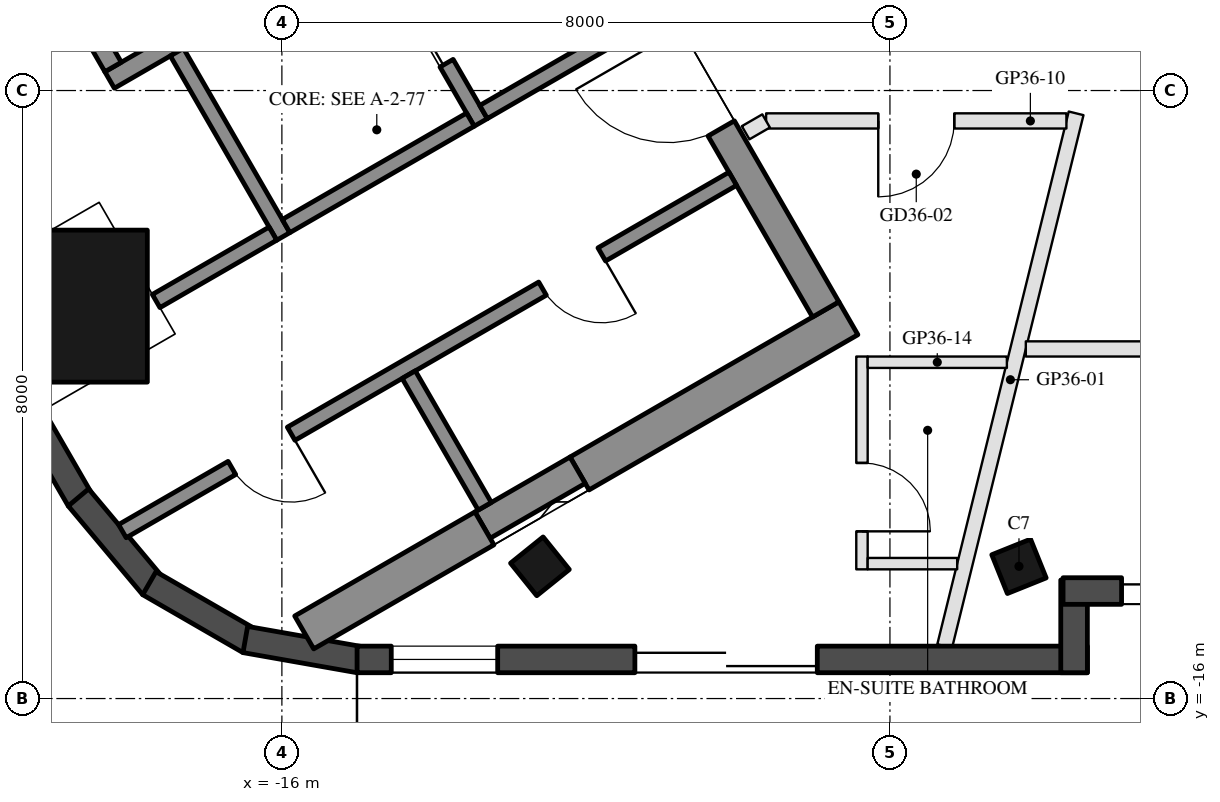
"""IFC4 building model, lengths in metres.
Left out: names, types, materials, properties, quantities, classifications, styles, units other than length and angle.
Written with IfcOpenShell. Run it as: python <this file> out.ifc"""

import sys

from ifc_helpers import new_model, si_unit, direction, frame, frame_2d, origin, origin_2d, place, context, subcontext, project, spatial, rectangle, hollow_rectangle, extrude, boolean, halfspace, element, fill, save


model = new_model("IFC4")
c1 = context("Model", 3, precision=1e-05, world=origin(), true_north=direction((0.0, 1.0)))
c2 = subcontext(c1, "Body", "Model", "MODEL_VIEW")
j1 = project(units=[si_unit("LENGTHUNIT", "METRE"), si_unit("PLANEANGLEUNIT", "RADIAN")], contexts=[c1])
p1 = place(None, origin())
s1 = spatial("IfcSite", under=j1, at=p1, CompositionType="ELEMENT")
p2 = place(p1, origin())
s2 = spatial("IfcBuilding", under=s1, at=p2, CompositionType="ELEMENT")
p3 = place(p2, frame((0.0, 0.0, 328.1)))
s3 = spatial("IfcBuildingStorey", under=s2, at=p3, CompositionType="ELEMENT", Elevation=328.1)
p4 = place(p3, frame((-12.605, -14.26, 0.0), z_axis=(0.121069901949, 0.150398600122, 0.981184151892), x_axis=(-0.992601568988, 0.00920533993, 0.121067695767)))
e1 = element("IfcColumn", 1, at=p4, inside=s3, PredefinedType="COLUMN", context=c2, shape_type="SweptSolid", body=[
    boolean("DIFFERENCE", boolean("DIFFERENCE", extrude(hollow_rectangle(XDim=0.55, YDim=0.55, WallThickness=0.025, at=origin_2d()), origin(), (0.0, 0.0, 1.0), 3.771), halfspace(frame((0.0, 0.0, 0.04), z_axis=(0.0, 0.0, 1.0), x_axis=(1.0, 0.0, 0.0)), True)), halfspace(frame((0.0, 0.0, 3.753), z_axis=(0.0, 0.0, 1.0), x_axis=(1.0, 0.0, 0.0)), False)),
])
p5 = place(p3, frame((-6.302, -14.26, 0.0), z_axis=(0.060870463553, 0.151232178432, 0.986622326361), x_axis=(-0.99813528898, 0.004713590867, 0.06085825296)))
e2 = element("IfcColumn", 2, at=p5, inside=s3, PredefinedType="COLUMN", context=c2, shape_type="SweptSolid", body=[
    boolean("DIFFERENCE", boolean("DIFFERENCE", extrude(hollow_rectangle(XDim=0.55, YDim=0.55, WallThickness=0.025, at=origin_2d()), origin(), (0.0, 0.0, 1.0), 3.75), halfspace(frame((0.0, 0.0, 0.034), z_axis=(0.0, 0.0, 1.0), x_axis=(1.0, 0.0, 0.0)), True)), halfspace(frame((0.0, 0.0, 3.735), z_axis=(0.0, 0.0, 1.0), x_axis=(1.0, 0.0, 0.0)), False)),
])
p6 = place(p3, frame((-18.77, -10.837, 0.0), z_axis=(0.190346159062, 0.109881938965, 0.975548204457), x_axis=(-0.499994868029, 0.866028366632, 1.1507946e-05)))
e3 = element("IfcColumn", 3, at=p6, inside=s3, PredefinedType="COLUMN", context=c2, shape_type="SweptSolid", body=[
    boolean("DIFFERENCE", boolean("DIFFERENCE", extrude(hollow_rectangle(XDim=2.0, YDim=2.0, WallThickness=0.05, at=origin_2d()), origin(), (0.0, 0.0, 1.0), 3.793), halfspace(frame((0.0, 0.0, 0.113), z_axis=(0.0, 0.0, 1.0), x_axis=(1.0, 0.0, 0.0)), True)), halfspace(frame((0.0, 0.0, 3.744), z_axis=(0.0, 0.0, 1.0), x_axis=(1.0, 0.0, 0.0)), False)),
])
p7 = place(p3, frame((-20.916, -9.47, 0.0), z_axis=(0.0, 0.0, 1.0), x_axis=(0.500042384281, -0.866000931825, 0.0)))
e4 = element("IfcWall", 4, at=p7, inside=s3, PredefinedType="SOLIDWALL", context=c2, shape_type="SweptSolid", body=[
    extrude(rectangle(XDim=4.514, YDim=0.35, at=frame_2d((2.257, 0.0))), origin(), (0.0, 0.0, 1.0), 3.45),
])
p8 = place(p3, frame((-18.677, -13.354, 0.0), z_axis=(0.0, 0.0, 1.0), x_axis=(0.642812493629, -0.766023562323, 0.0)))
e5 = element("IfcWall", 5, at=p8, inside=s3, PredefinedType="SOLIDWALL", context=c2, shape_type="SweptSolid", body=[
    extrude(rectangle(XDim=1.524, YDim=0.35, at=frame_2d((0.762, 0.0))), origin(), (0.0, 0.0, 1.0), 3.45),
])
for number, where, z_axis, x_axis in (
    (6, (-17.744, -14.482, 0.0), (0.0, 0.0, 1.0), (0.866, -0.5, 0.0)),
    (7, (-16.481, -15.223, 0.0), (0.0, 0.0, 1.0), (0.985, -0.174, 0.0)),
):
    element("IfcWall", number, at=place(p3, frame(where, z_axis=z_axis, x_axis=x_axis)), inside=s3, PredefinedType="SOLIDWALL", context=c2, shape_type="SweptSolid", body=[
        extrude(rectangle(XDim=1.524, YDim=0.35, at=frame_2d((0.762, 0.0))), origin(), (0.0, 0.0, 1.0), 3.45),
    ])
p9 = place(p3, frame((-15.011, -15.485, 0.0), z_axis=(0.0, 0.0, 1.0), x_axis=(1.0, 0.0, 0.0)))
e8 = element("IfcWall", 8, at=p9, inside=s3, PredefinedType="SOLIDWALL", context=c2, shape_type="SweptSolid", body=[
    extrude(rectangle(XDim=9.608, YDim=0.35, at=frame_2d((4.804, 0.0))), origin(), (0.0, 0.0, 1.0), 3.45),
])
p10 = place(p9, frame((0.45, 0.0, 0.3)))
e9 = element("IfcOpeningElement", 9, at=p10, cuts=e8, PredefinedType="OPENING", context=c2, shape_type="SweptSolid", body=[
    extrude(rectangle(XDim=1.4, YDim=2.65, at=frame_2d((0.7, 1.325))), frame((0.0, 0.185, 0.0), z_axis=(0.0, -1.0, 0.0), x_axis=(1.0, 0.0, 0.0)), (0.0, 0.0, 1.0), 0.37),
])
p11 = place(p9, frame((3.655, 0.0, 0.0)))
e10 = element("IfcOpeningElement", 10, at=p11, cuts=e8, PredefinedType="OPENING", context=c2, shape_type="SweptSolid", body=[
    extrude(rectangle(XDim=2.4, YDim=2.4, at=frame_2d((1.2, 1.2))), frame((0.0, 0.185, 0.0), z_axis=(0.0, -1.0, 0.0), x_axis=(1.0, 0.0, 0.0)), (0.0, 0.0, 1.0), 0.37),
])
p12 = place(p3, frame((-5.577, -15.66, 0.0), z_axis=(0.0, 0.0, 1.0), x_axis=(0.0, 1.0, 0.0)))
e11 = element("IfcWall", 11, at=p12, inside=s3, PredefinedType="SOLIDWALL", context=c2, shape_type="SweptSolid", body=[
    extrude(rectangle(XDim=1.22, YDim=0.35, at=frame_2d((0.61, 0.0))), origin(), (0.0, 0.0, 1.0), 3.45),
])
p13 = place(p3, frame((-5.722, -14.585, 0.0), z_axis=(0.0, 0.0, 1.0), x_axis=(1.0, 0.0, 0.0)))
e12 = element("IfcWall", 12, at=p13, inside=s3, PredefinedType="SOLIDWALL", context=c2, shape_type="SweptSolid", body=[
    extrude(rectangle(XDim=5.142, YDim=0.35, at=frame_2d((2.571, 0.0))), origin(), (0.0, 0.0, 1.0), 3.45),
])
p14 = place(p13, frame((0.77, 0.0, 0.0)))
e13 = element("IfcOpeningElement", 13, at=p14, cuts=e12, PredefinedType="OPENING", context=c2, shape_type="SweptSolid", body=[
    extrude(rectangle(XDim=2.4, YDim=2.4, at=frame_2d((1.2, 1.2))), frame((0.0, 0.185, 0.0), z_axis=(0.0, -1.0, 0.0), x_axis=(1.0, 0.0, 0.0)), (0.0, 0.0, 1.0), 0.37),
])
p15 = place(p13, frame((3.47, 0.0, 0.3)))
e14 = element("IfcOpeningElement", 14, at=p15, cuts=e12, PredefinedType="OPENING", context=c2, shape_type="SweptSolid", body=[
    extrude(rectangle(XDim=0.9, YDim=2.65, at=frame_2d((0.45, 1.325))), frame((0.0, 0.185, 0.0), z_axis=(0.0, -1.0, 0.0), x_axis=(1.0, 0.0, 0.0)), (0.0, 0.0, 1.0), 0.37),
])
p16 = place(p3, frame((-8.547, -10.997, 0.0), z_axis=(0.0, 0.0, 1.0), x_axis=(-0.866031306094, -0.49998977676, 0.0)))
e15 = element("IfcWall", 15, at=p16, inside=s3, PredefinedType="SHEAR", context=c2, shape_type="SweptSolid", body=[
    extrude(rectangle(XDim=4.084, YDim=0.5, at=frame_2d((2.042, 0.0))), origin(), (0.0, 0.0, 1.0), 3.45),
])
p17 = place(p3, frame((-12.109, -12.996, 0.0), z_axis=(0.0, 0.0, 1.0), x_axis=(-0.865977303747, -0.500083302456, 0.0)))
e16 = element("IfcWall", 16, at=p17, inside=s3, PredefinedType="SHEAR", context=c2, shape_type="SweptSolid", body=[
    extrude(rectangle(XDim=1.445, YDim=0.4, at=frame_2d((0.722, 0.0))), origin(), (0.0, 0.0, 1.0), 3.45),
])
p18 = place(p3, frame((-13.335, -13.761, 0.0), z_axis=(0.0, 0.0, 1.0), x_axis=(-0.866034122891, -0.49998489776, 0.0)))
e17 = element("IfcWall", 17, at=p18, inside=s3, PredefinedType="SHEAR", context=c2, shape_type="SweptSolid", body=[
    extrude(rectangle(XDim=2.738, YDim=0.5, at=frame_2d((1.369, 0.0))), origin(), (0.0, 0.0, 1.0), 3.45),
])
p19 = place(p3, frame((-13.845, -2.22, 0.0), z_axis=(0.0, 0.0, 1.0), x_axis=(0.500004234368, -0.866022959057, 0.0)))
e18 = element("IfcWall", 18, at=p19, inside=s3, PredefinedType="SHEAR", context=c2, shape_type="SweptSolid", body=[
    extrude(rectangle(XDim=10.0, YDim=0.4, at=frame_2d((5.0, 0.0))), origin(), (0.0, 0.0, 1.0), 3.45),
])
p20 = place(p19, frame((3.55, 0.0, 0.0)))
e19 = element("IfcOpeningElement", 19, at=p20, cuts=e18, PredefinedType="OPENING", context=c2, shape_type="SweptSolid", body=[
    extrude(rectangle(XDim=1.1, YDim=2.1, at=frame_2d((0.55, 1.05))), frame((0.0, 0.21, 0.0), z_axis=(0.0, -1.0, 0.0), x_axis=(1.0, 0.0, 0.0)), (0.0, 0.0, 1.0), 0.42),
])
p21 = place(p19, frame((5.85, 0.0, 0.0)))
e20 = element("IfcOpeningElement", 20, at=p21, cuts=e18, PredefinedType="OPENING", context=c2, shape_type="SweptSolid", body=[
    extrude(rectangle(XDim=1.4, YDim=2.1, at=frame_2d((0.7, 1.05))), frame((0.0, 0.21, 0.0), z_axis=(0.0, -1.0, 0.0), x_axis=(1.0, 0.0, 0.0)), (0.0, 0.0, 1.0), 0.42),
])
p22 = place(p3, frame((-12.681, -4.636, 0.0), z_axis=(0.0, 0.0, 1.0), x_axis=(-0.866021702275, -0.500006411147, 0.0)))
e21 = element("IfcWall", 21, at=p22, inside=s3, PredefinedType="SHEAR", context=c2, shape_type="SweptSolid", body=[
    extrude(rectangle(XDim=6.45, YDim=0.25, at=frame_2d((3.225, 0.0))), origin(), (0.0, 0.0, 1.0), 3.45),
])
p23 = place(p22, frame((0.3, 0.0, 0.0)))
e22 = element("IfcOpeningElement", 22, at=p23, cuts=e21, PredefinedType="OPENING", context=c2, shape_type="SweptSolid", body=[
    extrude(rectangle(XDim=1.0, YDim=2.1, at=frame_2d((0.5, 1.05))), frame((0.0, 0.135, 0.0), z_axis=(0.0, -1.0, 0.0), x_axis=(1.0, 0.0, 0.0)), (0.0, 0.0, 1.0), 0.27),
])
p24 = place(p3, frame((-19.496, -5.482, 0.0), z_axis=(0.0, 0.0, 1.0), x_axis=(0.499990435942, -0.866030925526, 0.0)))
e23 = element("IfcWall", 23, at=p24, inside=s3, PredefinedType="SHEAR", context=c2, shape_type="SweptSolid", body=[
    extrude(rectangle(XDim=2.55, YDim=0.25, at=frame_2d((1.275, 0.0))), origin(), (0.0, 0.0, 1.0), 3.45),
])
p25 = place(p3, frame((-17.381, -7.495, 0.0), z_axis=(0.0, 0.0, 1.0), x_axis=(0.500011755427, -0.866018616679, 0.0)))
e24 = element("IfcWall", 24, at=p25, inside=s3, PredefinedType="SHEAR", context=c2, shape_type="SweptSolid", body=[
    extrude(rectangle(XDim=2.8, YDim=0.2, at=frame_2d((1.4, 0.0))), origin(), (0.0, 0.0, 1.0), 3.45),
])
p26 = place(p3, frame((-14.783, -5.995, 0.0), z_axis=(0.0, 0.0, 1.0), x_axis=(0.49994636267, -0.866056369097, 0.0)))
e25 = element("IfcWall", 25, at=p26, inside=s3, PredefinedType="SHEAR", context=c2, shape_type="SweptSolid", body=[
    extrude(rectangle(XDim=2.8, YDim=0.2, at=frame_2d((1.4, 0.0))), origin(), (0.0, 0.0, 1.0), 3.45),
])
p27 = place(p26, frame((0.7, 0.0, 0.0)))
e26 = element("IfcOpeningElement", 26, at=p27, cuts=e25, PredefinedType="OPENING", context=c2, shape_type="SweptSolid", body=[
    extrude(rectangle(XDim=1.2, YDim=2.1, at=frame_2d((0.6, 1.05))), frame((0.0, 0.11, 0.0), z_axis=(0.0, -1.0, 0.0), x_axis=(1.0, 0.0, 0.0)), (0.0, 0.0, 1.0), 0.22),
])
p28 = place(p3, frame((-13.52, -8.383, 0.0), z_axis=(0.0, 0.0, 1.0), x_axis=(-0.866034573852, -0.49998411664, 0.0)))
e27 = element("IfcWall", 27, at=p28, inside=s3, PredefinedType="SHEAR", context=c2, shape_type="SweptSolid", body=[
    extrude(rectangle(XDim=2.8, YDim=0.2, at=frame_2d((1.4, 0.0))), origin(), (0.0, 0.0, 1.0), 3.45),
])
p29 = place(p3, frame((-11.268, -7.083, 0.0), z_axis=(0.0, 0.0, 1.0), x_axis=(-0.866050077142, -0.499957262057, 0.0)))
e28 = element("IfcWall", 28, at=p29, inside=s3, PredefinedType="SHEAR", context=c2, shape_type="SweptSolid", body=[
    extrude(rectangle(XDim=2.4, YDim=0.2, at=frame_2d((1.2, 0.0))), origin(), (0.0, 0.0, 1.0), 3.45),
])
p30 = place(p3, frame((-10.068, -9.162, 0.0), z_axis=(0.0, 0.0, 1.0), x_axis=(-0.866027741594, -0.499995950774, 0.0)))
e29 = element("IfcWall", 29, at=p30, inside=s3, PredefinedType="SHEAR", context=c2, shape_type="SweptSolid", body=[
    extrude(rectangle(XDim=9.272, YDim=0.2, at=frame_2d((4.636, 0.0))), origin(), (0.0, 0.0, 1.0), 3.45),
])
p31 = place(p30, frame((1.99, 0.0, 0.0)))
e30 = element("IfcOpeningElement", 30, at=p31, cuts=e29, PredefinedType="OPENING", context=c2, shape_type="SweptSolid", body=[
    extrude(rectangle(XDim=0.9, YDim=2.1, at=frame_2d((0.45, 1.05))), frame((0.0, 0.11, 0.0), z_axis=(0.0, -1.0, 0.0), x_axis=(1.0, 0.0, 0.0)), (0.0, 0.0, 1.0), 0.22),
])
p32 = place(p30, frame((6.709, 0.0, 0.0)))
e31 = element("IfcOpeningElement", 31, at=p32, cuts=e29, PredefinedType="OPENING", context=c2, shape_type="SweptSolid", body=[
    extrude(rectangle(XDim=0.9, YDim=2.1, at=frame_2d((0.45, 1.05))), frame((0.0, 0.11, 0.0), z_axis=(0.0, -1.0, 0.0), x_axis=(1.0, 0.0, 0.0)), (0.0, 0.0, 1.0), 0.22),
])
p33 = place(p3, frame((-16.118, -9.883, 0.0), z_axis=(0.0, 0.0, 1.0), x_axis=(-0.86600680221, -0.500032217487, 0.0)))
e32 = element("IfcWall", 32, at=p33, inside=s3, PredefinedType="SHEAR", context=c2, shape_type="SweptSolid", body=[
    extrude(rectangle(XDim=1.774, YDim=0.2, at=frame_2d((0.887, 0.0))), origin(), (0.0, 0.0, 1.0), 3.45),
])
p34 = place(p3, frame((-14.331, -11.738, 0.0), z_axis=(0.0, 0.0, 1.0), x_axis=(0.499972520799, -0.866041268327, 0.0)))
e33 = element("IfcWall", 33, at=p34, inside=s3, PredefinedType="SHEAR", context=c2, shape_type="SweptSolid", body=[
    extrude(rectangle(XDim=2.0, YDim=0.2, at=frame_2d((1.0, 0.0))), origin(), (0.0, 0.0, 1.0), 3.45),
])
p35 = place(p3, frame((-7.28, -15.31, 0.0), z_axis=(0.0, 0.0, 1.0), x_axis=(0.239495270955, 0.970897530736, 0.0)))
e34 = element("IfcWall", 34, at=p35, inside=s3, PredefinedType="PARTITIONING", context=c2, shape_type="SweptSolid", body=[
    extrude(rectangle(XDim=7.22, YDim=0.2, at=frame_2d((3.61, 0.0))), origin(), (0.0, 0.0, 1.0), 3.05),
])
p36 = place(p3, frame((-5.678, -8.4, 0.0), z_axis=(0.0, 0.0, 1.0), x_axis=(-1.0, 0.0, 0.0)))
e35 = element("IfcWall", 35, at=p36, inside=s3, PredefinedType="PARTITIONING", context=c2, shape_type="SweptSolid", body=[
    extrude(rectangle(XDim=3.951, YDim=0.2, at=frame_2d((1.976, 0.0))), origin(), (0.0, 0.0, 1.0), 3.05),
])
p37 = place(p36, frame((1.476, 0.0, 0.0)))
e36 = element("IfcOpeningElement", 36, at=p37, cuts=e35, PredefinedType="OPENING", context=c2, shape_type="SweptSolid", body=[
    extrude(rectangle(XDim=1.0, YDim=2.1, at=frame_2d((0.5, 1.05))), frame((0.0, 0.11, 0.0), z_axis=(0.0, -1.0, 0.0), x_axis=(1.0, 0.0, 0.0)), (0.0, 0.0, 1.0), 0.22),
])
p38 = place(p3, frame((-9.629, -8.4, 0.0), z_axis=(0.0, 0.0, 1.0), x_axis=(-0.865963302823, -0.500107546598, 0.0)))
e37 = element("IfcWall", 37, at=p38, inside=s3, PredefinedType="PARTITIONING", context=c2, shape_type="SweptSolid", body=[
    extrude(rectangle(XDim=0.311, YDim=0.2, at=frame_2d((0.156, 0.0))), origin(), (0.0, 0.0, 1.0), 3.45),
])
p39 = place(p3, frame((-8.368, -11.5, 0.0), z_axis=(0.0, 0.0, 1.0), x_axis=(0.0, -1.0, 0.0)))
e38 = element("IfcWall", 38, at=p39, inside=s3, PredefinedType="PARTITIONING", context=c2, shape_type="SweptSolid", body=[
    extrude(rectangle(XDim=2.8, YDim=0.15, at=frame_2d((1.4, 0.0))), origin(), (0.0, 0.0, 1.0), 3.05),
])
p40 = place(p39, frame((1.4, 0.0, 0.0)))
e39 = element("IfcOpeningElement", 39, at=p40, cuts=e38, PredefinedType="OPENING", context=c2, shape_type="SweptSolid", body=[
    extrude(rectangle(XDim=0.9, YDim=2.1, at=frame_2d((0.45, 1.05))), frame((0.0, 0.085, 0.0), z_axis=(0.0, -1.0, 0.0), x_axis=(1.0, 0.0, 0.0)), (0.0, 0.0, 1.0), 0.17),
])
p41 = place(p3, frame((-8.293, -14.225, 0.0), z_axis=(0.0, 0.0, 1.0), x_axis=(1.0, 0.0, 0.0)))
e40 = element("IfcWall", 40, at=p41, inside=s3, PredefinedType="PARTITIONING", context=c2, shape_type="SweptSolid", body=[
    extrude(rectangle(XDim=1.178, YDim=0.15, at=frame_2d((0.589, 0.0))), origin(), (0.0, 0.0, 1.0), 3.45),
])
p42 = place(p3, frame((-8.293, -11.575, 0.0), z_axis=(0.0, 0.0, 1.0), x_axis=(1.0, 0.0, 0.0)))
e41 = element("IfcWall", 41, at=p42, inside=s3, PredefinedType="PARTITIONING", context=c2, shape_type="SweptSolid", body=[
    extrude(rectangle(XDim=1.832, YDim=0.15, at=frame_2d((0.916, 0.0))), origin(), (0.0, 0.0, 1.0), 3.45),
])
p43 = place(p3, frame((1.2, -11.4, 0.0), z_axis=(0.0, 0.0, 1.0), x_axis=(-1.0, 0.0, 0.0)))
e42 = element("IfcWall", 42, at=p43, inside=s3, PredefinedType="PARTITIONING", context=c2, shape_type="SweptSolid", body=[
    extrude(rectangle(XDim=7.412, YDim=0.2, at=frame_2d((3.706, 0.0))), origin(), (0.0, 0.0, 1.0), 3.05),
])
p44 = place(p43, frame((3.206, 0.0, 0.0)))
e43 = element("IfcOpeningElement", 43, at=p44, cuts=e42, PredefinedType="OPENING", context=c2, shape_type="SweptSolid", body=[
    extrude(rectangle(XDim=1.0, YDim=2.1, at=frame_2d((0.5, 1.05))), frame((0.0, 0.11, 0.0), z_axis=(0.0, -1.0, 0.0), x_axis=(1.0, 0.0, 0.0)), (0.0, 0.0, 1.0), 0.22),
])
p45 = place(p10, origin())
e44 = element("IfcWindow", 44, at=p45, inside=s3, PartitioningType="SINGLE_PANEL", PredefinedType="WINDOW", context=c2, shape_type="SweptSolid", body=[
    extrude(rectangle(XDim=1.4, YDim=2.65, at=frame_2d((0.7, 1.325))), frame((0.0, 0.03, 0.0), z_axis=(0.0, -1.0, 0.0), x_axis=(1.0, 0.0, 0.0)), (0.0, 0.0, 1.0), 0.06),
])
fill(e9, e44)
p46 = place(p11, frame((2.4, 0.0, 0.0), z_axis=(0.0, 0.0, 1.0), x_axis=(-1.0, 0.0, 0.0)))
e45 = element("IfcDoor", 45, at=p46, inside=s3, OperationType="SLIDING_TO_LEFT", PredefinedType="DOOR", context=c2, shape_type="SweptSolid", body=[
    extrude(rectangle(XDim=2.4, YDim=2.4, at=frame_2d((1.2, 1.2))), frame((0.0, 0.025, 0.0), z_axis=(0.0, -1.0, 0.0), x_axis=(1.0, 0.0, 0.0)), (0.0, 0.0, 1.0), 0.05),
])
fill(e10, e45)
p47 = place(p14, frame((2.4, 0.0, 0.0), z_axis=(0.0, 0.0, 1.0), x_axis=(-1.0, 0.0, 0.0)))
e46 = element("IfcDoor", 46, at=p47, inside=s3, OperationType="SLIDING_TO_LEFT", PredefinedType="DOOR", context=c2, shape_type="SweptSolid", body=[
    extrude(rectangle(XDim=2.4, YDim=2.4, at=frame_2d((1.2, 1.2))), frame((0.0, 0.025, 0.0), z_axis=(0.0, -1.0, 0.0), x_axis=(1.0, 0.0, 0.0)), (0.0, 0.0, 1.0), 0.05),
])
fill(e13, e46)
p48 = place(p27, origin())
e47 = element("IfcDoor", 47, at=p48, inside=s3, OperationType="DOUBLE_DOOR_SLIDING", PredefinedType="DOOR", context=c2, shape_type="SweptSolid", body=[
    extrude(rectangle(XDim=1.2, YDim=2.1, at=frame_2d((0.6, 1.05))), frame((0.0, 0.025, 0.0), z_axis=(0.0, -1.0, 0.0), x_axis=(1.0, 0.0, 0.0)), (0.0, 0.0, 1.0), 0.05),
])
fill(e26, e47)
p49 = place(p31, origin())
e48 = element("IfcDoor", 48, at=p49, inside=s3, OperationType="SINGLE_SWING_LEFT", PredefinedType="DOOR", context=c2, shape_type="SweptSolid", body=[
    extrude(rectangle(XDim=0.9, YDim=2.1, at=frame_2d((0.45, 1.05))), frame((0.0, 0.025, 0.0), z_axis=(0.0, -1.0, 0.0), x_axis=(1.0, 0.0, 0.0)), (0.0, 0.0, 1.0), 0.05),
])
fill(e30, e48)
p50 = place(p32, origin())
e49 = element("IfcDoor", 49, at=p50, inside=s3, OperationType="SINGLE_SWING_LEFT", PredefinedType="DOOR", context=c2, shape_type="SweptSolid", body=[
    extrude(rectangle(XDim=0.9, YDim=2.1, at=frame_2d((0.45, 1.05))), frame((0.0, 0.025, 0.0), z_axis=(0.0, -1.0, 0.0), x_axis=(1.0, 0.0, 0.0)), (0.0, 0.0, 1.0), 0.05),
])
fill(e31, e49)
p51 = place(p21, frame((1.4, 0.0, 0.0), z_axis=(0.0, 0.0, 1.0), x_axis=(-1.0, 0.0, 0.0)))
e50 = element("IfcDoor", 50, at=p51, inside=s3, OperationType="DOUBLE_DOOR_SINGLE_SWING", PredefinedType="DOOR", context=c2, shape_type="SweptSolid", body=[
    extrude(rectangle(XDim=1.4, YDim=2.1, at=frame_2d((0.7, 1.05))), frame((0.0, 0.025, 0.0), z_axis=(0.0, -1.0, 0.0), x_axis=(1.0, 0.0, 0.0)), (0.0, 0.0, 1.0), 0.05),
])
fill(e20, e50)
p52 = place(p40, origin())
e51 = element("IfcDoor", 51, at=p52, inside=s3, OperationType="SINGLE_SWING_RIGHT", PredefinedType="DOOR", context=c2, shape_type="SweptSolid", body=[
    extrude(rectangle(XDim=0.9, YDim=2.1, at=frame_2d((0.45, 1.05))), frame((0.0, 0.025, 0.0), z_axis=(0.0, -1.0, 0.0), x_axis=(1.0, 0.0, 0.0)), (0.0, 0.0, 1.0), 0.05),
])
fill(e39, e51)
p53 = place(p37, origin())
e52 = element("IfcDoor", 52, at=p53, inside=s3, OperationType="SINGLE_SWING_RIGHT", PredefinedType="DOOR", context=c2, shape_type="SweptSolid", body=[
    extrude(rectangle(XDim=1.0, YDim=2.1, at=frame_2d((0.5, 1.05))), frame((0.0, 0.025, 0.0), z_axis=(0.0, -1.0, 0.0), x_axis=(1.0, 0.0, 0.0)), (0.0, 0.0, 1.0), 0.05),
])
fill(e36, e52)
save(model, sys.argv[1])
